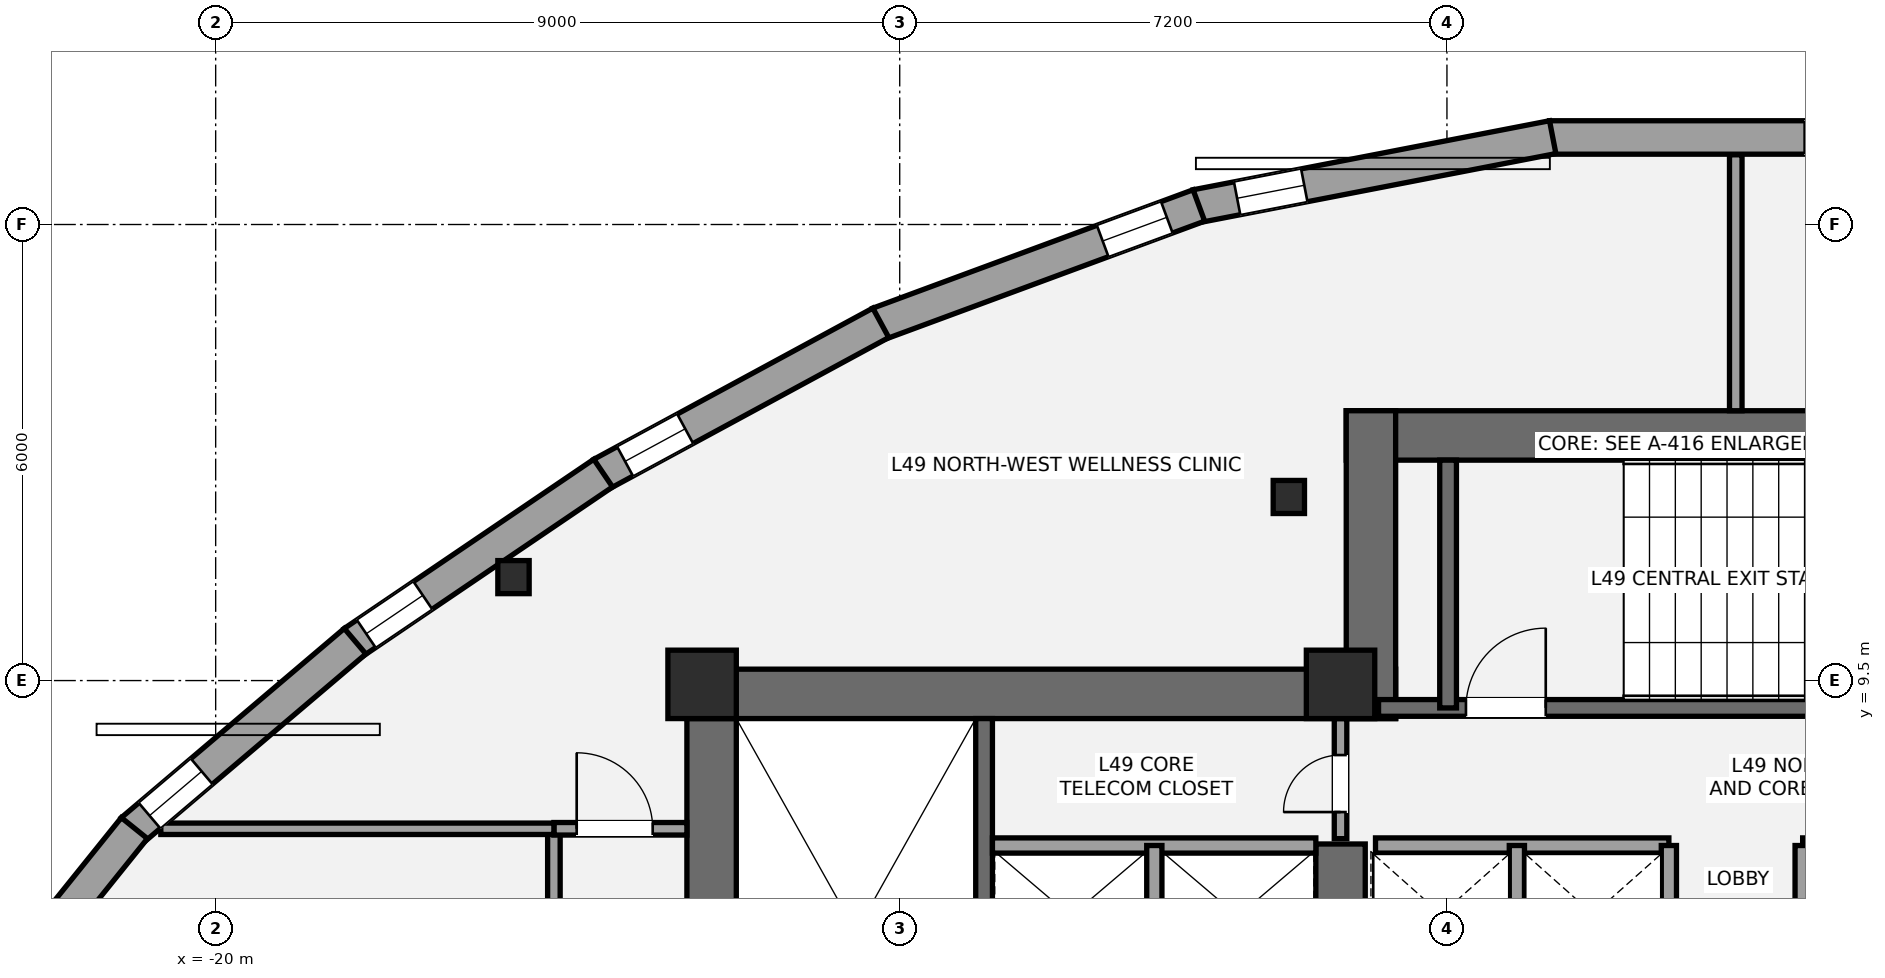
"""IFC4 building model, lengths in metres.
Left out: names, types, materials, properties, quantities, classifications, styles, units other than length and angle.
Written with IfcOpenShell. Run it as: python <this file> out.ifc"""

import sys

from ifc_helpers import new_model, si_unit, direction, frame, frame_2d, origin, origin_2d, place, context, subcontext, project, spatial, rectangle, i_section, extrude, element, fill, save


model = new_model("IFC4")
c1 = context("Model", 3, precision=1e-05, world=origin(), true_north=direction((0.0, 1.0)))
c2 = subcontext(c1, "Body", "Model", "MODEL_VIEW")
j1 = project(units=[si_unit("LENGTHUNIT", "METRE"), si_unit("PLANEANGLEUNIT", "RADIAN")], contexts=[c1])
p1 = place(None, origin())
s1 = spatial("IfcSite", under=j1, at=p1, CompositionType="ELEMENT")
p2 = place(p1, origin())
s2 = spatial("IfcBuilding", under=s1, at=p2, CompositionType="ELEMENT")
p3 = place(p2, frame((0.0, 0.0, 179.0)))
s3 = spatial("IfcBuildingStorey", under=s2, at=p3, CompositionType="ELEMENT", Elevation=179.0)
p4 = place(p3, frame((-13.475, 1.2, 0.0), z_axis=(0.0, 0.0, 1.0), x_axis=(0.0, 1.0, 0.0)))
e1 = element("IfcWall", 1, at=p4, inside=s3, PredefinedType="SHEAR", context=c2, shape_type="SweptSolid", body=[
    extrude(rectangle(XDim=8.45, YDim=0.65, at=frame_2d((4.225, 0.0))), origin(), (0.0, 0.0, 1.0), 3.2),
])
p5 = place(p3, frame((-13.8, 9.325, 0.0), z_axis=(0.0, 0.0, 1.0), x_axis=(1.0, 0.0, 0.0)))
e2 = element("IfcWall", 2, at=p5, inside=s3, PredefinedType="SHEAR", context=c2, shape_type="SweptSolid", body=[
    extrude(rectangle(XDim=9.325, YDim=0.65, at=frame_2d((4.663, 0.0))), origin(), (0.0, 0.0, 1.0), 3.2),
])
p6 = place(p3, frame((-5.2, 5.35, 0.0), z_axis=(0.0, 0.0, 1.0), x_axis=(0.0, 1.0, 0.0)))
e3 = element("IfcWall", 3, at=p6, inside=s3, PredefinedType="SHEAR", context=c2, shape_type="SweptSolid", body=[
    extrude(rectangle(XDim=2.0, YDim=0.65, at=frame_2d((1.0, 0.0))), origin(), (0.0, 0.0, 1.0), 3.2),
])
p7 = place(p3, frame((-9.89, 1.85, 0.0), z_axis=(0.0, 0.0, 1.0), x_axis=(0.0, 1.0, 0.0)))
e4 = element("IfcWall", 4, at=p7, inside=s3, PredefinedType="SHEAR", context=c2, shape_type="SweptSolid", body=[
    extrude(rectangle(XDim=7.15, YDim=0.22, at=frame_2d((3.575, 0.0))), origin(), (0.0, 0.0, 1.0), 3.2),
])
p8 = place(p3, frame((-5.125, 12.725, 0.0), z_axis=(0.0, 0.0, 1.0), x_axis=(1.0, 0.0, 0.0)))
e5 = element("IfcWall", 5, at=p8, inside=s3, PredefinedType="SHEAR", context=c2, shape_type="SweptSolid", body=[
    extrude(rectangle(XDim=10.25, YDim=0.65, at=frame_2d((5.125, 0.0))), origin(), (0.0, 0.0, 1.0), 3.2),
])
p9 = place(p3, frame((-4.8, 9.0, 0.0), z_axis=(0.0, 0.0, 1.0), x_axis=(0.0, 1.0, 0.0)))
e6 = element("IfcWall", 6, at=p9, inside=s3, PredefinedType="SHEAR", context=c2, shape_type="SweptSolid", body=[
    extrude(rectangle(XDim=4.05, YDim=0.65, at=frame_2d((2.025, 0.0))), origin(), (0.0, 0.0, 1.0), 3.2),
])
p10 = place(p3, frame((-4.7, 9.14, 0.0), z_axis=(0.0, 0.0, 1.0), x_axis=(1.0, 0.0, 0.0)))
e7 = element("IfcWall", 7, at=p10, inside=s3, PredefinedType="SHEAR", context=c2, shape_type="SweptSolid", body=[
    extrude(rectangle(XDim=9.3, YDim=0.22, at=frame_2d((4.65, 0.0))), origin(), (0.0, 0.0, 1.0), 3.2),
])
p11 = place(p10, frame((1.15, 0.0, 0.0)))
e8 = element("IfcOpeningElement", 8, at=p11, cuts=e7, PredefinedType="OPENING", context=c2, shape_type="SweptSolid", body=[
    extrude(rectangle(XDim=1.05, YDim=2.15, at=frame_2d((0.525, 1.075))), frame((0.0, 0.12, 0.0), z_axis=(0.0, -1.0, 0.0), x_axis=(1.0, 0.0, 0.0)), (0.0, 0.0, 1.0), 0.24),
])
p12 = place(p3, frame((-3.785, 9.14, 0.0), z_axis=(0.0, 0.0, 1.0), x_axis=(0.0, 1.0, 0.0)))
e9 = element("IfcWall", 9, at=p12, inside=s3, PredefinedType="SHEAR", context=c2, shape_type="SweptSolid", body=[
    extrude(rectangle(XDim=3.26, YDim=0.22, at=frame_2d((1.63, 0.0))), origin(), (0.0, 0.0, 1.0), 3.2),
])
for number, where, z_axis, x_axis in (
    (10, (-13.6, 9.45, 0.0), (0.0, 0.0, 1.0), (1.0, 0.0, 0.0)),
    (11, (-5.2, 9.45, 0.0), (0.0, 0.0, 1.0), (1.0, 0.0, 0.0)),
):
    element("IfcColumn", number, at=place(p3, frame(where, z_axis=z_axis, x_axis=x_axis)), inside=s3, PredefinedType="COLUMN", context=c2, shape_type="SweptSolid", body=[
        extrude(rectangle(XDim=0.9, YDim=0.9, at=origin_2d()), origin(), (0.0, 0.0, 1.0), 3.2),
    ])
for number, where, z_axis, x_axis in (
    (12, (-5.88, 11.915, 0.0), (0.0, 0.0, 1.0), (1.0, 0.0, 0.0)),
    (13, (-16.082, 10.861, 0.0), (0.0, 0.0, 1.0), (1.0, 0.0, 0.0)),
):
    element("IfcColumn", number, at=place(p3, frame(where, z_axis=z_axis, x_axis=x_axis)), inside=s3, PredefinedType="COLUMN", context=c2, shape_type="SweptSolid", body=[
        extrude(i_section(OverallWidth=0.412, OverallDepth=0.435, WebThickness=0.036, FlangeThickness=0.057, at=origin_2d()), origin(), (0.0, 0.0, 1.0), 3.2),
    ])
p13 = place(p3, frame((-2.45, 16.645, 0.0), z_axis=(0.0, 0.0, 1.0), x_axis=(1.0, 0.0, 0.0)))
e14 = element("IfcWall", 14, at=p13, inside=s3, PredefinedType="STANDARD", context=c2, shape_type="SweptSolid", body=[
    extrude(rectangle(XDim=4.9, YDim=0.44, at=frame_2d((2.45, 0.0))), origin(), (0.0, 0.0, 1.0), 2.315),
])
p14 = place(p13, frame((3.357, 0.0, 0.58)))
e15 = element("IfcOpeningElement", 15, at=p14, cuts=e14, PredefinedType="OPENING", context=c2, shape_type="SweptSolid", body=[
    extrude(rectangle(XDim=0.9, YDim=1.35, at=frame_2d((0.45, 0.675))), frame((0.0, 0.23, 0.0), z_axis=(0.0, -1.0, 0.0), x_axis=(1.0, 0.0, 0.0)), (0.0, 0.0, 1.0), 0.46),
])
p15 = place(p3, frame((-7.098, 15.741, 0.0), z_axis=(0.0, 0.0, 1.0), x_axis=(0.981751851942, 0.190166509166, 0.0)))
e16 = element("IfcWall", 16, at=p15, inside=s3, PredefinedType="STANDARD", context=c2, shape_type="SweptSolid", body=[
    extrude(rectangle(XDim=4.777, YDim=0.44, at=frame_2d((2.389, 0.0))), origin(), (0.0, 0.0, 1.0), 2.315),
])
p16 = place(p15, frame((0.548, 0.0, 0.58)))
e17 = element("IfcOpeningElement", 17, at=p16, cuts=e16, PredefinedType="OPENING", context=c2, shape_type="SweptSolid", body=[
    extrude(rectangle(XDim=0.9, YDim=1.35, at=frame_2d((0.45, 0.675))), frame((0.0, 0.23, 0.0), z_axis=(0.0, -1.0, 0.0), x_axis=(1.0, 0.0, 0.0)), (0.0, 0.0, 1.0), 0.46),
])
p17 = place(p3, frame((-11.277, 14.193, 0.0), z_axis=(0.0, 0.0, 1.0), x_axis=(0.937993730452, 0.346652220004, 0.0)))
e18 = element("IfcWall", 18, at=p17, inside=s3, PredefinedType="STANDARD", context=c2, shape_type="SweptSolid", body=[
    extrude(rectangle(XDim=4.492, YDim=0.44, at=frame_2d((2.246, 0.0))), origin(), (0.0, 0.0, 1.0), 2.315),
])
p18 = place(p17, frame((3.143, 0.0, 0.58)))
e19 = element("IfcOpeningElement", 19, at=p18, cuts=e18, PredefinedType="OPENING", context=c2, shape_type="SweptSolid", body=[
    extrude(rectangle(XDim=0.9, YDim=1.35, at=frame_2d((0.45, 0.675))), frame((0.0, 0.23, 0.0), z_axis=(0.0, -1.0, 0.0), x_axis=(1.0, 0.0, 0.0)), (0.0, 0.0, 1.0), 0.46),
])
p19 = place(p3, frame((-14.92, 12.218, 0.0), z_axis=(0.0, 0.0, 1.0), x_axis=(0.879306250646, 0.476256776933, 0.0)))
e20 = element("IfcWall", 20, at=p19, inside=s3, PredefinedType="STANDARD", context=c2, shape_type="SweptSolid", body=[
    extrude(rectangle(XDim=4.175, YDim=0.44, at=frame_2d((2.088, 0.0))), origin(), (0.0, 0.0, 1.0), 2.315),
])
p20 = place(p19, frame((0.349, 0.0, 0.58)))
e21 = element("IfcOpeningElement", 21, at=p20, cuts=e20, PredefinedType="OPENING", context=c2, shape_type="SweptSolid", body=[
    extrude(rectangle(XDim=0.9, YDim=1.35, at=frame_2d((0.45, 0.675))), frame((0.0, 0.23, 0.0), z_axis=(0.0, -1.0, 0.0), x_axis=(1.0, 0.0, 0.0)), (0.0, 0.0, 1.0), 0.46),
])
p21 = place(p3, frame((-18.185, 10.003, 0.0), z_axis=(0.0, 0.0, 1.0), x_axis=(0.827725942945, 0.561132572015, 0.0)))
e22 = element("IfcWall", 22, at=p21, inside=s3, PredefinedType="STANDARD", context=c2, shape_type="SweptSolid", body=[
    extrude(rectangle(XDim=3.966, YDim=0.44, at=frame_2d((1.983, 0.0))), origin(), (0.0, 0.0, 1.0), 2.315),
])
p22 = place(p21, frame((0.2, 0.0, 0.58)))
e23 = element("IfcOpeningElement", 23, at=p22, cuts=e22, PredefinedType="OPENING", context=c2, shape_type="SweptSolid", body=[
    extrude(rectangle(XDim=0.9, YDim=1.35, at=frame_2d((0.45, 0.675))), frame((0.0, 0.23, 0.0), z_axis=(0.0, -1.0, 0.0), x_axis=(1.0, 0.0, 0.0)), (0.0, 0.0, 1.0), 0.46),
])
p23 = place(p3, frame((-21.099, 7.529, 0.0), z_axis=(0.0, 0.0, 1.0), x_axis=(0.762499647343, 0.646988630349, 0.0)))
e24 = element("IfcWall", 24, at=p23, inside=s3, PredefinedType="STANDARD", context=c2, shape_type="SweptSolid", body=[
    extrude(rectangle(XDim=3.847, YDim=0.44, at=frame_2d((1.923, 0.0))), origin(), (0.0, 0.0, 1.0), 2.315),
])
p24 = place(p23, frame((0.3, 0.0, 0.42)))
e25 = element("IfcOpeningElement", 25, at=p24, cuts=e24, PredefinedType="OPENING", context=c2, shape_type="SweptSolid", body=[
    extrude(rectangle(XDim=0.9, YDim=1.35, at=frame_2d((0.45, 0.675))), frame((0.0, 0.23, 0.0), z_axis=(0.0, -1.0, 0.0), x_axis=(1.0, 0.0, 0.0)), (0.0, 0.0, 1.0), 0.46),
])
p25 = place(p3, frame((-23.367, 4.702, 0.0), z_axis=(0.0, 0.0, 1.0), x_axis=(0.626642586146, 0.779306787618, 0.0)))
e26 = element("IfcWall", 26, at=p25, inside=s3, PredefinedType="STANDARD", context=c2, shape_type="SweptSolid", body=[
    extrude(rectangle(XDim=3.665, YDim=0.44, at=frame_2d((1.833, 0.0))), origin(), (0.0, 0.0, 1.0), 2.315),
])
p26 = place(p3, frame((-9.78, 7.33, 0.0), z_axis=(0.0, 0.0, 1.0), x_axis=(1.0, 0.0, 0.0)))
e27 = element("IfcWall", 27, at=p26, inside=s3, PredefinedType="SOLIDWALL", context=c2, shape_type="SweptSolid", body=[
    extrude(rectangle(XDim=4.255, YDim=0.2, at=frame_2d((2.127, 0.0))), origin(), (0.0, 0.0, 1.0), 3.02),
])
p27 = place(p3, frame((-7.65, 5.47, 0.0), z_axis=(0.0, 0.0, 1.0), x_axis=(0.0, 1.0, 0.0)))
e28 = element("IfcWall", 28, at=p27, inside=s3, PredefinedType="SOLIDWALL", context=c2, shape_type="SweptSolid", body=[
    extrude(rectangle(XDim=1.86, YDim=0.2, at=frame_2d((0.93, 0.0))), origin(), (0.0, 0.0, 1.0), 3.02),
])
for number, where, z_axis, x_axis in (
    (29, (-4.74, 7.33, 0.0), (0.0, 0.0, 1.0), (1.0, 0.0, 0.0)),
    (30, (0.88, 7.33, 0.0), (0.0, 0.0, 1.0), (1.0, 0.0, 0.0)),
):
    element("IfcWall", number, at=place(p3, frame(where, z_axis=z_axis, x_axis=x_axis)), inside=s3, PredefinedType="SOLIDWALL", context=c2, shape_type="SweptSolid", body=[
        extrude(rectangle(XDim=3.86, YDim=0.2, at=frame_2d((1.93, 0.0))), origin(), (0.0, 0.0, 1.0), 3.02),
    ])
for number, where, z_axis, x_axis in (
    (31, (-2.88, 5.52, 0.0), (0.0, 0.0, 1.0), (0.0, 1.0, 0.0)),
    (32, (-0.88, 5.52, 0.0), (0.0, 0.0, 1.0), (0.0, 1.0, 0.0)),
    (33, (0.88, 5.52, 0.0), (0.0, 0.0, 1.0), (0.0, 1.0, 0.0)),
):
    element("IfcWall", number, at=place(p3, frame(where, z_axis=z_axis, x_axis=x_axis)), inside=s3, PredefinedType="SOLIDWALL", context=c2, shape_type="SweptSolid", body=[
        extrude(rectangle(XDim=1.81, YDim=0.2, at=frame_2d((0.905, 0.0))), origin(), (0.0, 0.0, 1.0), 3.02),
    ])
p28 = place(p3, frame((-5.2, 7.42, 0.0), z_axis=(0.0, 0.0, 1.0), x_axis=(0.0, 1.0, 0.0)))
e34 = element("IfcWall", 34, at=p28, inside=s3, PredefinedType="PARTITIONING", context=c2, shape_type="SweptSolid", body=[
    extrude(rectangle(XDim=1.58, YDim=0.165, at=frame_2d((0.79, 0.0))), origin(), (0.0, 0.0, 1.0), 3.02),
])
p29 = place(p28, frame((0.35, 0.0, 0.0)))
e35 = element("IfcOpeningElement", 35, at=p29, cuts=e34, PredefinedType="OPENING", context=c2, shape_type="SweptSolid", body=[
    extrude(rectangle(XDim=0.75, YDim=2.1, at=frame_2d((0.375, 1.05))), frame((0.0, 0.093, 0.0), z_axis=(0.0, -1.0, 0.0), x_axis=(1.0, 0.0, 0.0)), (0.0, 0.0, 1.0), 0.185),
])
p30 = place(p3, frame((-15.55, -11.514, 0.0), z_axis=(0.0, 0.0, 1.0), x_axis=(0.0, 1.0, 0.0)))
e36 = element("IfcWall", 36, at=p30, inside=s3, PredefinedType="PARTITIONING", context=c2, shape_type="SweptSolid", body=[
    extrude(rectangle(XDim=19.064, YDim=0.165, at=frame_2d((9.532, 0.0))), origin(), (0.0, 0.0, 1.0), 2.473),
])
p31 = place(p30, frame((4.365, 0.0, 0.0)))
e37 = element("IfcOpeningElement", 37, at=p31, cuts=e36, PredefinedType="OPENING", context=c2, shape_type="SweptSolid", body=[
    extrude(rectangle(XDim=0.85, YDim=2.1, at=frame_2d((0.425, 1.05))), frame((0.0, 0.093, 0.0), z_axis=(0.0, -1.0, 0.0), x_axis=(1.0, 0.0, 0.0)), (0.0, 0.0, 1.0), 0.185),
])
p32 = place(p30, frame((7.515, 0.0, 0.0)))
e38 = element("IfcOpeningElement", 38, at=p32, cuts=e36, PredefinedType="OPENING", context=c2, shape_type="SweptSolid", body=[
    extrude(rectangle(XDim=1.0, YDim=2.15, at=frame_2d((0.5, 1.075))), frame((0.0, 0.093, 0.0), z_axis=(0.0, -1.0, 0.0), x_axis=(1.0, 0.0, 0.0)), (0.0, 0.0, 1.0), 0.185),
])
p33 = place(p30, frame((11.915, 0.0, 0.0)))
e39 = element("IfcOpeningElement", 39, at=p33, cuts=e36, PredefinedType="OPENING", context=c2, shape_type="SweptSolid", body=[
    extrude(rectangle(XDim=1.0, YDim=2.15, at=frame_2d((0.5, 1.075))), frame((0.0, 0.093, 0.0), z_axis=(0.0, -1.0, 0.0), x_axis=(1.0, 0.0, 0.0)), (0.0, 0.0, 1.0), 0.185),
])
p34 = place(p30, frame((16.29, 0.0, 0.0)))
e40 = element("IfcOpeningElement", 40, at=p34, cuts=e36, PredefinedType="OPENING", context=c2, shape_type="SweptSolid", body=[
    extrude(rectangle(XDim=1.0, YDim=2.15, at=frame_2d((0.5, 1.075))), frame((0.0, 0.093, 0.0), z_axis=(0.0, -1.0, 0.0), x_axis=(1.0, 0.0, 0.0)), (0.0, 0.0, 1.0), 0.185),
])
p35 = place(p3, frame((-15.55, 7.55, 0.0), z_axis=(0.0, 0.0, 1.0), x_axis=(1.0, 0.0, 0.0)))
e41 = element("IfcWall", 41, at=p35, inside=s3, PredefinedType="PARTITIONING", context=c2, shape_type="SweptSolid", body=[
    extrude(rectangle(XDim=1.75, YDim=0.165, at=frame_2d((0.875, 0.0))), origin(), (0.0, 0.0, 1.0), 3.02),
])
p36 = place(p35, frame((0.3, 0.0, 0.0)))
e42 = element("IfcOpeningElement", 42, at=p36, cuts=e41, PredefinedType="OPENING", context=c2, shape_type="SweptSolid", body=[
    extrude(rectangle(XDim=1.0, YDim=2.15, at=frame_2d((0.5, 1.075))), frame((0.0, 0.093, 0.0), z_axis=(0.0, -1.0, 0.0), x_axis=(1.0, 0.0, 0.0)), (0.0, 0.0, 1.0), 0.185),
])
p37 = place(p3, frame((-20.722, 7.55, 0.0), z_axis=(0.0, 0.0, 1.0), x_axis=(1.0, 0.0, 0.0)))
e43 = element("IfcWall", 43, at=p37, inside=s3, PredefinedType="PLUMBINGWALL", context=c2, shape_type="SweptSolid", body=[
    extrude(rectangle(XDim=5.172, YDim=0.15, at=frame_2d((2.586, 0.0))), origin(), (0.0, 0.0, 1.0), 2.473),
])
p38 = place(p3, frame((0.0, 13.05, 0.0), z_axis=(0.0, 0.0, 1.0), x_axis=(0.0, 1.0, 0.0)))
e44 = element("IfcWall", 44, at=p38, inside=s3, PredefinedType="PARTITIONING", context=c2, shape_type="SweptSolid", body=[
    extrude(rectangle(XDim=3.367, YDim=0.165, at=frame_2d((1.684, 0.0))), origin(), (0.0, 0.0, 1.0), 3.02),
])
p39 = place(p14, origin())
e45 = element("IfcWindow", 45, at=p39, inside=s3, PartitioningType="SINGLE_PANEL", PredefinedType="WINDOW", context=c2, shape_type="SweptSolid", body=[
    extrude(rectangle(XDim=0.9, YDim=1.35, at=frame_2d((0.45, 0.675))), frame((0.0, -0.01, 0.0), z_axis=(0.0, -1.0, 0.0), x_axis=(1.0, 0.0, 0.0)), (0.0, 0.0, 1.0), 0.06),
])
fill(e15, e45)
p40 = place(p16, origin())
e46 = element("IfcWindow", 46, at=p40, inside=s3, PartitioningType="SINGLE_PANEL", PredefinedType="WINDOW", context=c2, shape_type="SweptSolid", body=[
    extrude(rectangle(XDim=0.9, YDim=1.35, at=frame_2d((0.45, 0.675))), frame((0.0, -0.01, 0.0), z_axis=(0.0, -1.0, 0.0), x_axis=(1.0, 0.0, 0.0)), (0.0, 0.0, 1.0), 0.06),
])
fill(e17, e46)
p41 = place(p18, origin())
e47 = element("IfcWindow", 47, at=p41, inside=s3, PartitioningType="SINGLE_PANEL", PredefinedType="WINDOW", context=c2, shape_type="SweptSolid", body=[
    extrude(rectangle(XDim=0.9, YDim=1.35, at=frame_2d((0.45, 0.675))), frame((0.0, -0.01, 0.0), z_axis=(0.0, -1.0, 0.0), x_axis=(1.0, 0.0, 0.0)), (0.0, 0.0, 1.0), 0.06),
])
fill(e19, e47)
p42 = place(p20, origin())
e48 = element("IfcWindow", 48, at=p42, inside=s3, PartitioningType="SINGLE_PANEL", PredefinedType="WINDOW", context=c2, shape_type="SweptSolid", body=[
    extrude(rectangle(XDim=0.9, YDim=1.35, at=frame_2d((0.45, 0.675))), frame((0.0, -0.01, 0.0), z_axis=(0.0, -1.0, 0.0), x_axis=(1.0, 0.0, 0.0)), (0.0, 0.0, 1.0), 0.06),
])
fill(e21, e48)
p43 = place(p22, origin())
e49 = element("IfcWindow", 49, at=p43, inside=s3, PartitioningType="SINGLE_PANEL", PredefinedType="WINDOW", context=c2, shape_type="SweptSolid", body=[
    extrude(rectangle(XDim=0.9, YDim=1.35, at=frame_2d((0.45, 0.675))), frame((0.0, -0.01, 0.0), z_axis=(0.0, -1.0, 0.0), x_axis=(1.0, 0.0, 0.0)), (0.0, 0.0, 1.0), 0.06),
])
fill(e23, e49)
p44 = place(p24, origin())
e50 = element("IfcWindow", 50, at=p44, inside=s3, PartitioningType="SINGLE_PANEL", PredefinedType="WINDOW", context=c2, shape_type="SweptSolid", body=[
    extrude(rectangle(XDim=0.9, YDim=1.35, at=frame_2d((0.45, 0.675))), frame((0.0, -0.01, 0.0), z_axis=(0.0, -1.0, 0.0), x_axis=(1.0, 0.0, 0.0)), (0.0, 0.0, 1.0), 0.06),
])
fill(e25, e50)
p45 = place(p11, origin())
e51 = element("IfcDoor", 51, at=p45, inside=s3, OperationType="SINGLE_SWING_RIGHT", PredefinedType="DOOR", context=c2, shape_type="SweptSolid", body=[
    extrude(rectangle(XDim=1.05, YDim=2.15, at=frame_2d((0.525, 1.075))), frame((0.0, 0.025, 0.0), z_axis=(0.0, -1.0, 0.0), x_axis=(1.0, 0.0, 0.0)), (0.0, 0.0, 1.0), 0.05),
])
fill(e8, e51)
p46 = place(p29, origin())
e52 = element("IfcDoor", 52, at=p46, inside=s3, OperationType="SINGLE_SWING_LEFT", PredefinedType="DOOR", context=c2, shape_type="SweptSolid", body=[
    extrude(rectangle(XDim=0.75, YDim=2.1, at=frame_2d((0.375, 1.05))), frame((0.0, 0.025, 0.0), z_axis=(0.0, -1.0, 0.0), x_axis=(1.0, 0.0, 0.0)), (0.0, 0.0, 1.0), 0.05),
])
fill(e35, e52)
p47 = place(p36, origin())
e53 = element("IfcDoor", 53, at=p47, inside=s3, OperationType="SINGLE_SWING_LEFT", PredefinedType="DOOR", context=c2, shape_type="SweptSolid", body=[
    extrude(rectangle(XDim=1.0, YDim=2.15, at=frame_2d((0.5, 1.075))), frame((0.0, 0.025, 0.0), z_axis=(0.0, -1.0, 0.0), x_axis=(1.0, 0.0, 0.0)), (0.0, 0.0, 1.0), 0.05),
])
fill(e42, e53)
save(model, sys.argv[1])
